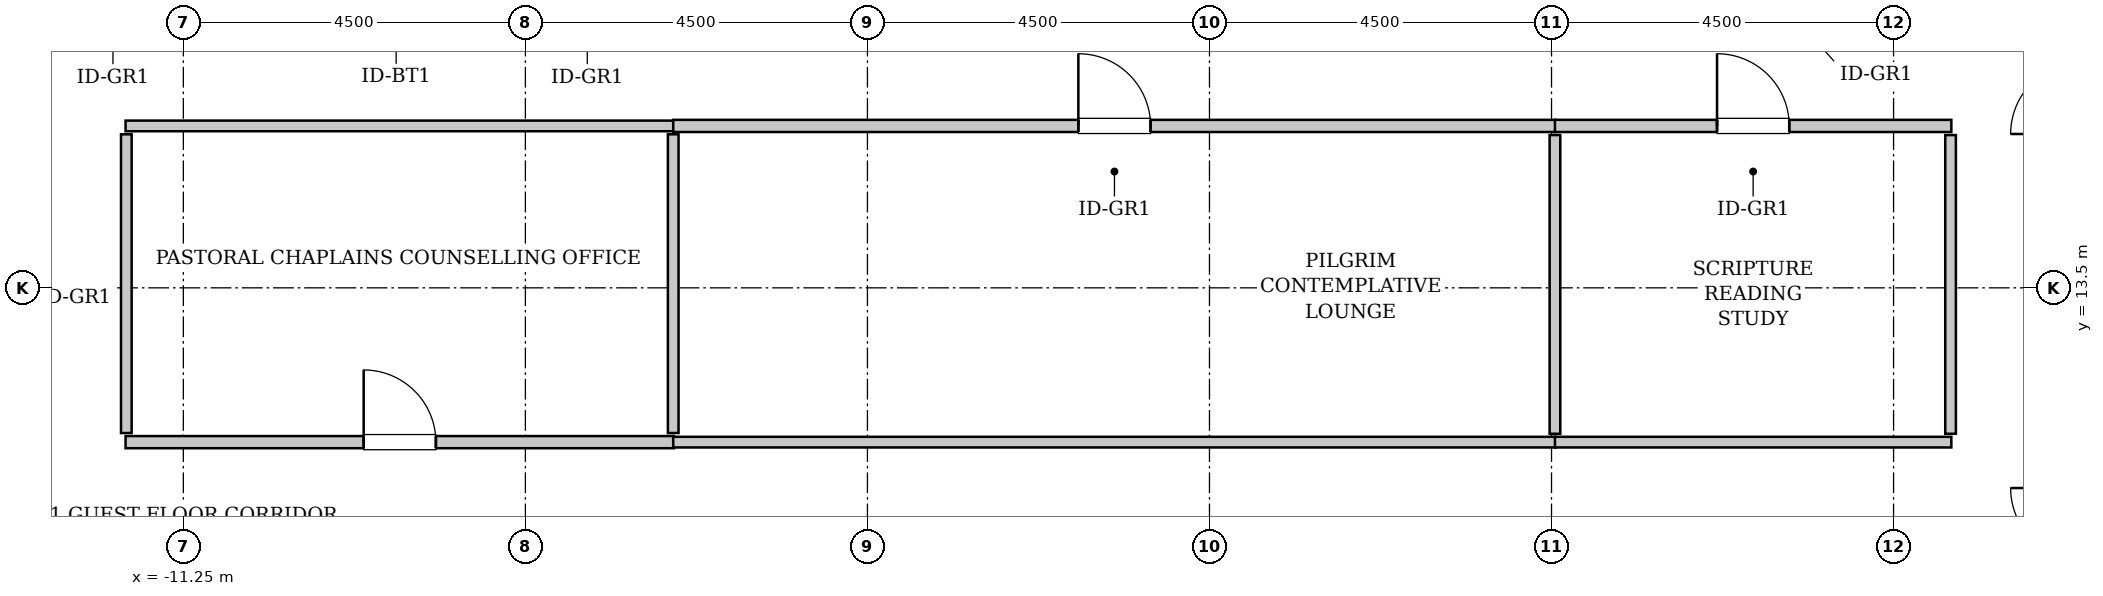
"""IFC4 building model, lengths in metres.
Left out: names, types, materials, properties, quantities, classifications, styles, units other than length and angle.
Written with IfcOpenShell. Run it as: python <this file> out.ifc"""

import sys

from ifc_helpers import new_model, si_unit, direction, frame, frame_2d, origin, place, context, subcontext, project, spatial, rectangle, extrude, source, transform, mapped, element, fill, save


model = new_model("IFC4")
c1 = context("Model", 3, precision=1e-05, world=origin(), true_north=direction((0.0, 1.0)))
c2 = subcontext(c1, "Body", "Model", "MODEL_VIEW")
j1 = project(units=[si_unit("LENGTHUNIT", "METRE"), si_unit("PLANEANGLEUNIT", "RADIAN")], contexts=[c1])
p1 = place(None, origin())
s1 = spatial("IfcSite", under=j1, at=p1, CompositionType="ELEMENT")
p2 = place(p1, origin())
s2 = spatial("IfcBuilding", under=s1, at=p2, CompositionType="ELEMENT")
p3 = place(p2, frame((0.0, 0.0, 167.8)))
s3 = spatial("IfcBuildingStorey", under=s2, at=p3, CompositionType="ELEMENT", Elevation=167.8)
m1 = source(origin(), c2, "Body", "SweptSolid", [
    extrude(rectangle(XDim=7.215, YDim=0.16, at=frame_2d((3.607, 0.0))), origin(), (0.0, 0.0, 1.0), 3.535),
])
p4 = place(p3, frame((-12.01, 11.47, 0.0), z_axis=(0.0, 0.0, 1.0), x_axis=(1.0, 0.0, 0.0)))
e1 = element("IfcWall", 1, at=p4, inside=s3, PredefinedType="PARTITIONING", context=c2, shape_type="MappedRepresentation", body=[
    mapped(m1, transform((0.0, 0.0, 0.0), x_axis=(1.0, 0.0, 0.0), y_axis=(0.0, 1.0, 0.0), z_axis=(0.0, 0.0, 1.0), scale=1.0)),
])
p5 = place(p4, frame((3.133, 0.0, 0.0)))
e2 = element("IfcOpeningElement", 2, at=p5, cuts=e1, PredefinedType="OPENING", context=c2, shape_type="SweptSolid", body=[
    extrude(rectangle(XDim=0.95, YDim=2.1, at=frame_2d((0.475, 1.05))), frame((0.0, 0.09, 0.0), z_axis=(0.0, -1.0, 0.0), x_axis=(1.0, 0.0, 0.0)), (0.0, 0.0, 1.0), 0.18),
])
m2 = source(origin(), c2, "Body", "SweptSolid", [
    extrude(rectangle(XDim=7.215, YDim=0.14, at=frame_2d((3.607, 0.0))), origin(), (0.0, 0.0, 1.0), 3.535),
])
p6 = place(p3, frame((-12.01, 15.63, 0.0), z_axis=(0.0, 0.0, 1.0), x_axis=(1.0, 0.0, 0.0)))
e3 = element("IfcWall", 3, at=p6, inside=s3, PredefinedType="PARTITIONING", context=c2, shape_type="MappedRepresentation", body=[
    mapped(m2, transform((0.0, 0.0, 0.0), x_axis=(1.0, 0.0, 0.0), y_axis=(0.0, 1.0, 0.0), z_axis=(0.0, 0.0, 1.0), scale=1.0)),
])
m3 = source(origin(), c2, "Body", "SweptSolid", [
    extrude(rectangle(XDim=3.93, YDim=0.14, at=frame_2d((1.965, 0.0))), origin(), (0.0, 0.0, 1.0), 3.535),
])
for number, where, z_axis, x_axis in (
    (4, (-12.0, 11.59, 0.0), (0.0, 0.0, 1.0), (0.0, 1.0, 0.0)),
    (5, (-4.805, 11.59, 0.0), (0.0, 0.0, 1.0), (0.0, 1.0, 0.0)),
):
    element("IfcWall", number, at=place(p3, frame(where, z_axis=z_axis, x_axis=x_axis)), inside=s3, PredefinedType="PARTITIONING", context=c2, shape_type="MappedRepresentation", body=[
        mapped(m3, transform((0.0, 0.0, 0.0), x_axis=(1.0, 0.0, 0.0), y_axis=(0.0, 1.0, 0.0), z_axis=(0.0, 0.0, 1.0), scale=1.0)),
    ])
m4 = source(origin(), c2, "Body", "SweptSolid", [
    extrude(rectangle(XDim=11.61, YDim=0.16, at=frame_2d((5.805, 0.0))), origin(), (0.0, 0.0, 1.0), 3.535),
])
p7 = place(p3, frame((-4.805, 15.63, 0.0), z_axis=(0.0, 0.0, 1.0), x_axis=(1.0, 0.0, 0.0)))
e6 = element("IfcWall", 6, at=p7, inside=s3, PredefinedType="PARTITIONING", context=c2, shape_type="MappedRepresentation", body=[
    mapped(m4, transform((0.0, 0.0, 0.0), x_axis=(1.0, 0.0, 0.0), y_axis=(0.0, 1.0, 0.0), z_axis=(0.0, 0.0, 1.0), scale=1.0)),
])
p8 = place(p7, frame((5.33, 0.0, 0.0)))
e7 = element("IfcOpeningElement", 7, at=p8, cuts=e6, PredefinedType="OPENING", context=c2, shape_type="SweptSolid", body=[
    extrude(rectangle(XDim=0.95, YDim=2.1, at=frame_2d((0.475, 1.05))), frame((0.0, 0.09, 0.0), z_axis=(0.0, -1.0, 0.0), x_axis=(1.0, 0.0, 0.0)), (0.0, 0.0, 1.0), 0.18),
])
m5 = source(origin(), c2, "Body", "SweptSolid", [
    extrude(rectangle(XDim=11.61, YDim=0.14, at=frame_2d((5.805, 0.0))), origin(), (0.0, 0.0, 1.0), 3.535),
])
p9 = place(p3, frame((-4.805, 11.47, 0.0), z_axis=(0.0, 0.0, 1.0), x_axis=(1.0, 0.0, 0.0)))
e8 = element("IfcWall", 8, at=p9, inside=s3, PredefinedType="PARTITIONING", context=c2, shape_type="MappedRepresentation", body=[
    mapped(m5, transform((0.0, 0.0, 0.0), x_axis=(1.0, 0.0, 0.0), y_axis=(0.0, 1.0, 0.0), z_axis=(0.0, 0.0, 1.0), scale=1.0)),
])
p10 = place(p3, frame((6.795, 11.58, 0.0), z_axis=(0.0, 0.0, 1.0), x_axis=(0.0, 1.0, 0.0)))
e9 = element("IfcWall", 9, at=p10, inside=s3, PredefinedType="PARTITIONING", context=c2, shape_type="MappedRepresentation", body=[
    mapped(m3, transform((0.0, 0.0, 0.0), x_axis=(1.0, 0.0, 0.0), y_axis=(0.0, 1.0, 0.0), z_axis=(0.0, 0.0, 1.0), scale=1.0)),
])
m6 = source(origin(), c2, "Body", "SweptSolid", [
    extrude(rectangle(XDim=5.215, YDim=0.16, at=frame_2d((2.607, 0.0))), origin(), (0.0, 0.0, 1.0), 3.535),
])
p11 = place(p3, frame((6.795, 15.63, 0.0), z_axis=(0.0, 0.0, 1.0), x_axis=(1.0, 0.0, 0.0)))
e10 = element("IfcWall", 10, at=p11, inside=s3, PredefinedType="PARTITIONING", context=c2, shape_type="MappedRepresentation", body=[
    mapped(m6, transform((0.0, 0.0, 0.0), x_axis=(1.0, 0.0, 0.0), y_axis=(0.0, 1.0, 0.0), z_axis=(0.0, 0.0, 1.0), scale=1.0)),
])
p12 = place(p11, frame((2.133, 0.0, 0.0)))
e11 = element("IfcOpeningElement", 11, at=p12, cuts=e10, PredefinedType="OPENING", context=c2, shape_type="SweptSolid", body=[
    extrude(rectangle(XDim=0.95, YDim=2.1, at=frame_2d((0.475, 1.05))), frame((0.0, 0.09, 0.0), z_axis=(0.0, -1.0, 0.0), x_axis=(1.0, 0.0, 0.0)), (0.0, 0.0, 1.0), 0.18),
])
m7 = source(origin(), c2, "Body", "SweptSolid", [
    extrude(rectangle(XDim=5.215, YDim=0.14, at=frame_2d((2.607, 0.0))), origin(), (0.0, 0.0, 1.0), 3.535),
])
p13 = place(p3, frame((6.795, 11.47, 0.0), z_axis=(0.0, 0.0, 1.0), x_axis=(1.0, 0.0, 0.0)))
e12 = element("IfcWall", 12, at=p13, inside=s3, PredefinedType="PARTITIONING", context=c2, shape_type="MappedRepresentation", body=[
    mapped(m7, transform((0.0, 0.0, 0.0), x_axis=(1.0, 0.0, 0.0), y_axis=(0.0, 1.0, 0.0), z_axis=(0.0, 0.0, 1.0), scale=1.0)),
])
p14 = place(p3, frame((12.0, 11.58, 0.0), z_axis=(0.0, 0.0, 1.0), x_axis=(0.0, 1.0, 0.0)))
e13 = element("IfcWall", 13, at=p14, inside=s3, PredefinedType="PARTITIONING", context=c2, shape_type="MappedRepresentation", body=[
    mapped(m3, transform((0.0, 0.0, 0.0), x_axis=(1.0, 0.0, 0.0), y_axis=(0.0, 1.0, 0.0), z_axis=(0.0, 0.0, 1.0), scale=1.0)),
])
m8 = source(origin(), c2, "Body", "SweptSolid", [
    extrude(rectangle(XDim=0.95, YDim=2.1, at=frame_2d((0.475, 1.05))), frame((0.0, 0.025, 0.0), z_axis=(0.0, -1.0, 0.0), x_axis=(1.0, 0.0, 0.0)), (0.0, 0.0, 1.0), 0.05),
])
p15 = place(p5, origin())
e14 = element("IfcDoor", 14, at=p15, inside=s3, OperationType="SINGLE_SWING_LEFT", PredefinedType="DOOR", context=c2, shape_type="MappedRepresentation", body=[
    mapped(m8, transform((0.0, 0.0, 0.0), x_axis=(1.0, 0.0, 0.0), y_axis=(0.0, 1.0, 0.0), z_axis=(0.0, 0.0, 1.0), scale=1.0)),
])
fill(e2, e14)
p16 = place(p8, origin())
e15 = element("IfcDoor", 15, at=p16, inside=s3, OperationType="SINGLE_SWING_LEFT", PredefinedType="DOOR", context=c2, shape_type="MappedRepresentation", body=[
    mapped(m8, transform((0.0, 0.0, 0.0), x_axis=(1.0, 0.0, 0.0), y_axis=(0.0, 1.0, 0.0), z_axis=(0.0, 0.0, 1.0), scale=1.0)),
])
fill(e7, e15)
p17 = place(p12, origin())
e16 = element("IfcDoor", 16, at=p17, inside=s3, OperationType="SINGLE_SWING_LEFT", PredefinedType="DOOR", context=c2, shape_type="MappedRepresentation", body=[
    mapped(m8, transform((0.0, 0.0, 0.0), x_axis=(1.0, 0.0, 0.0), y_axis=(0.0, 1.0, 0.0), z_axis=(0.0, 0.0, 1.0), scale=1.0)),
])
fill(e11, e16)
save(model, sys.argv[1])
